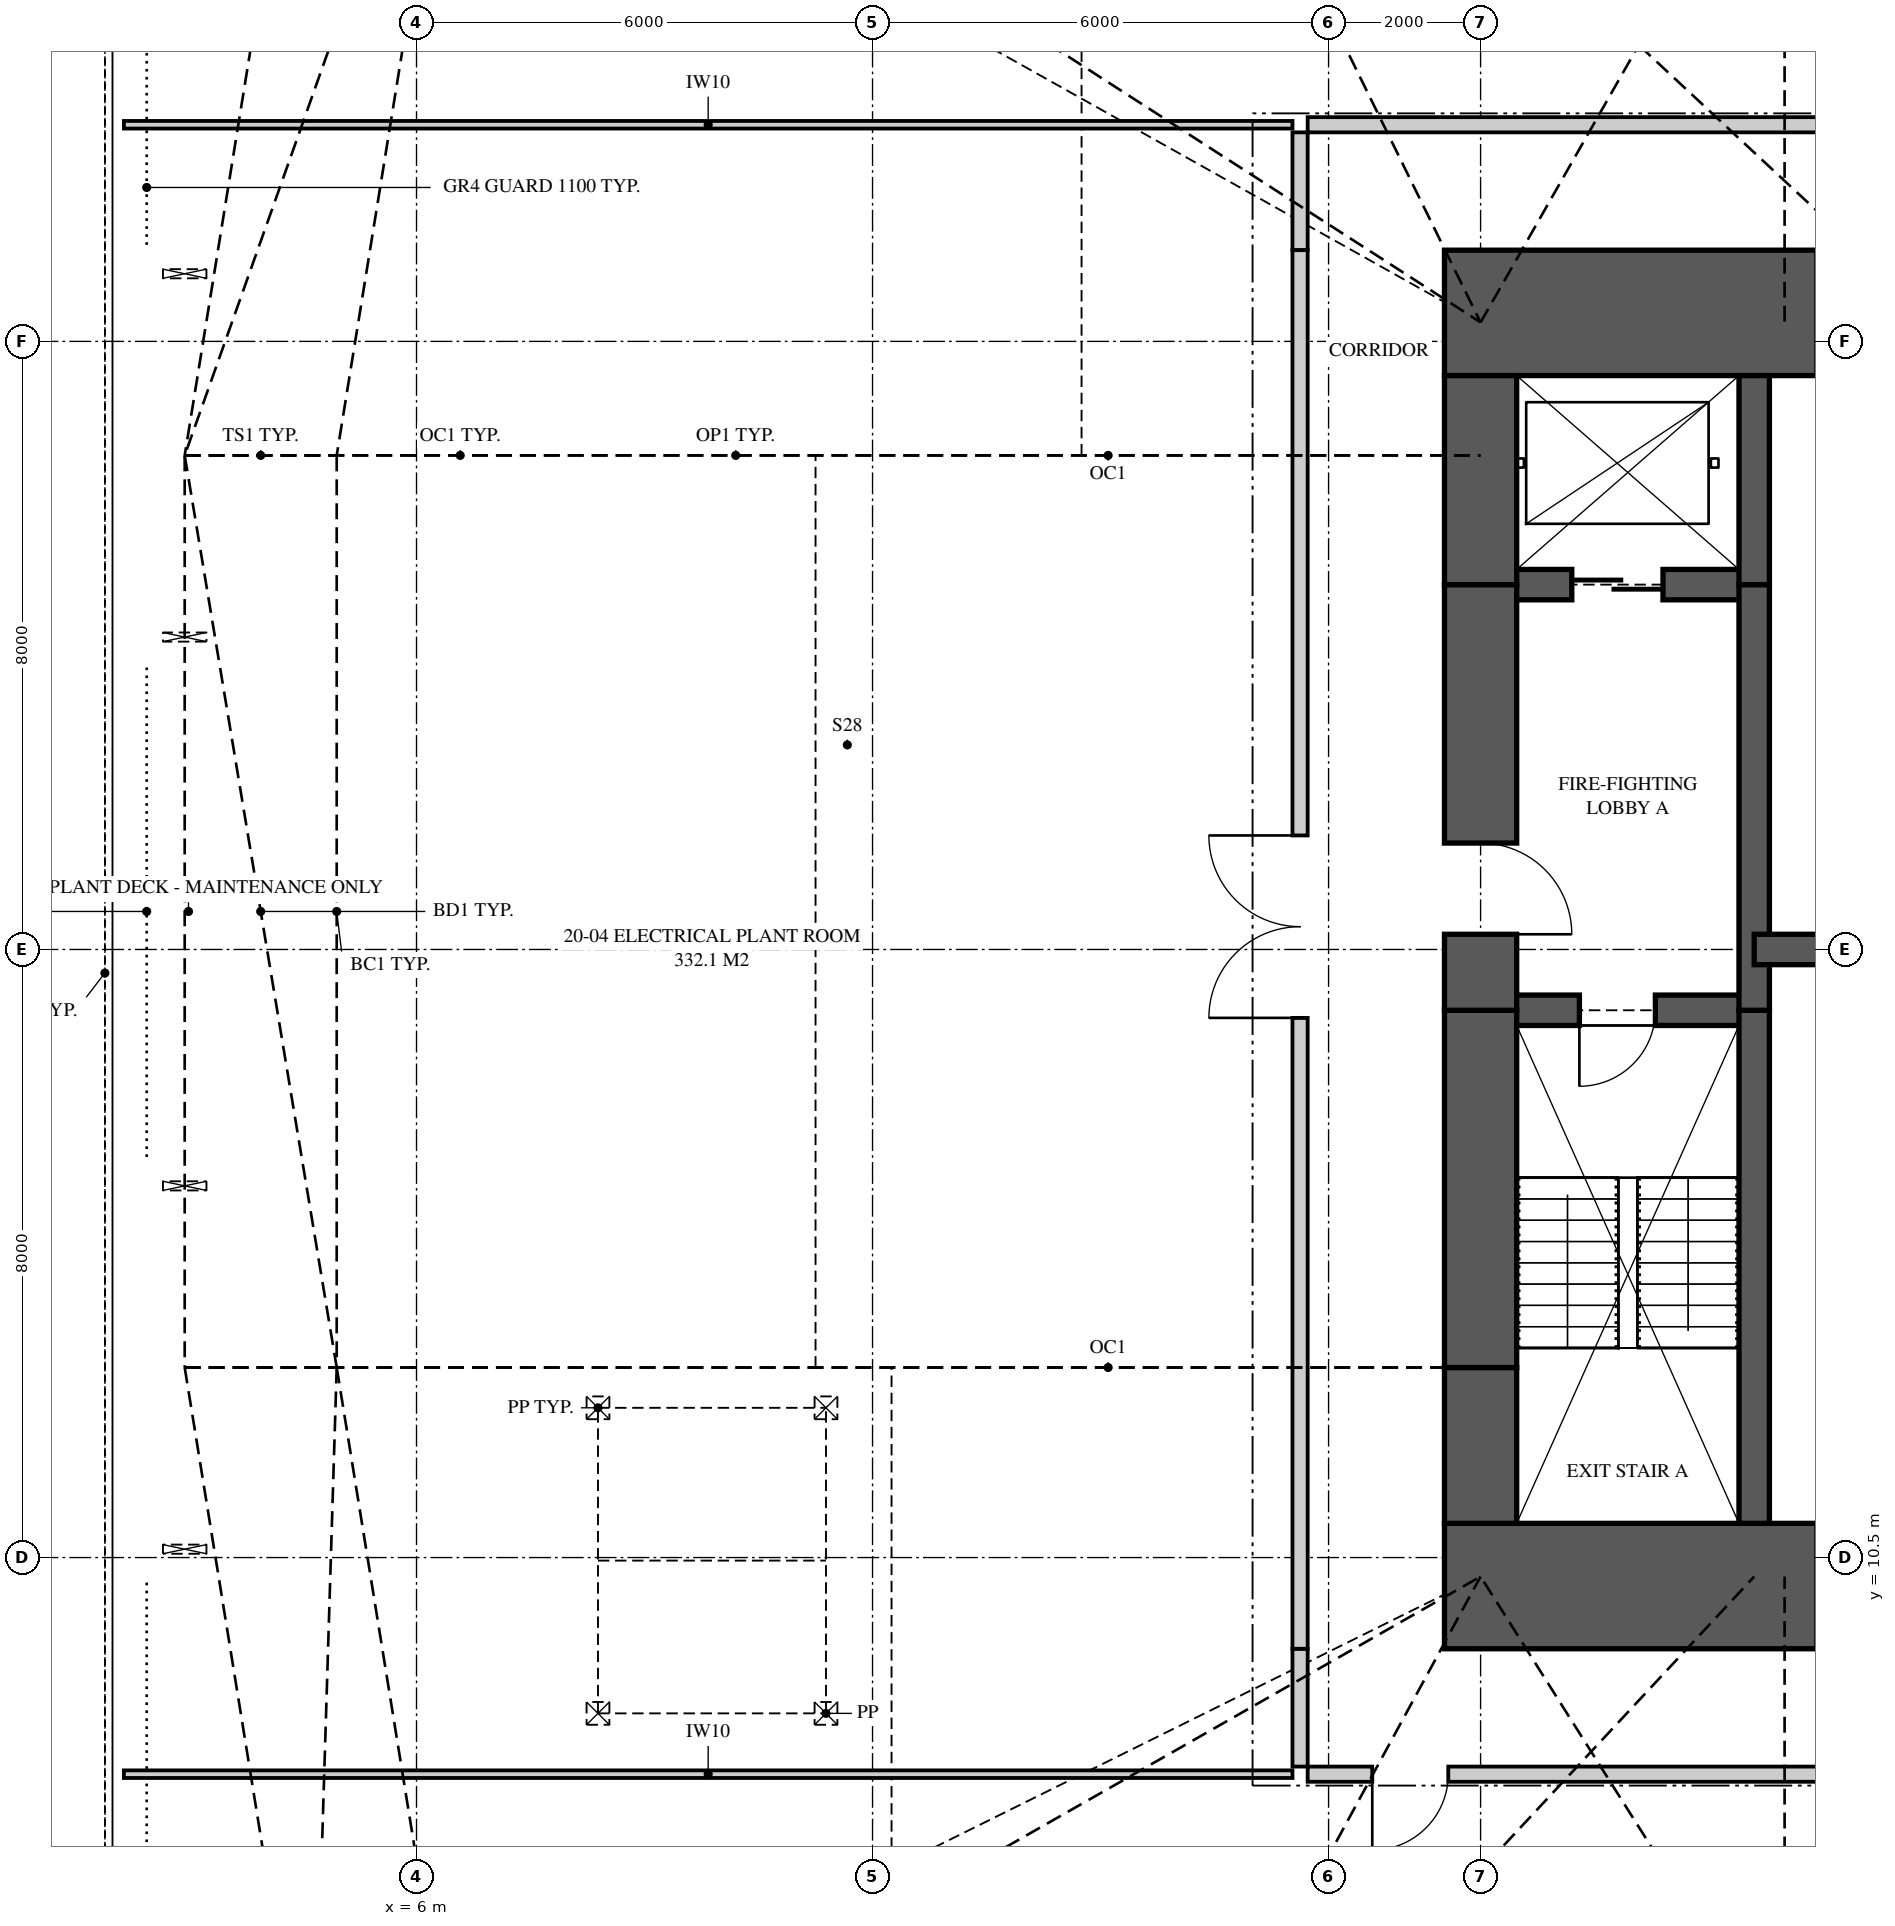
"""IFC4 building model, lengths in metres.
Left out: names, types, materials, properties, quantities, classifications, styles, units other than length and angle.
Written with IfcOpenShell. Run it as: python <this file> out.ifc"""

import sys

from ifc_helpers import new_model, si_unit, direction, frame, frame_2d, origin, place, context, subcontext, project, spatial, polyline, rectangle, outline, extrude, element, fill, save


model = new_model("IFC4")
c1 = context("Model", 3, precision=1e-05, world=origin(), true_north=direction((0.0, 1.0)))
c2 = subcontext(c1, "Body", "Model", "MODEL_VIEW")
j1 = project(units=[si_unit("LENGTHUNIT", "METRE"), si_unit("PLANEANGLEUNIT", "RADIAN")], contexts=[c1])
p1 = place(None, origin())
s1 = spatial("IfcSite", under=j1, at=p1, CompositionType="ELEMENT")
p2 = place(p1, origin())
s2 = spatial("IfcBuilding", under=s1, at=p2, CompositionType="ELEMENT")
p3 = place(p2, frame((0.0, 0.0, 74.75)))
s3 = spatial("IfcBuildingStorey", under=s2, at=p3, CompositionType="ELEMENT", Elevation=74.75)
p4 = place(p3, frame((19.525, 10.125, 0.0), z_axis=(0.0, 0.0, 1.0), x_axis=(1.0, 0.0, 0.0)))
e1 = element("IfcWall", 1, at=p4, inside=s3, PredefinedType="SHEAR", context=c2, shape_type="SweptSolid", body=[
    extrude(rectangle(XDim=6.475, YDim=1.65, at=frame_2d((3.238, 0.0))), origin(), (0.0, 0.0, 1.0), 5.0),
])
p5 = place(p4, frame((4.9, 0.0, 0.0)))
e2 = element("IfcOpeningElement", 2, at=p5, cuts=e1, PredefinedType="OPENING", context=c2, shape_type="SweptSolid", body=[
    extrude(rectangle(XDim=0.75, YDim=2.1, at=frame_2d((0.375, 1.05))), frame((0.0, 0.835, 0.0), z_axis=(0.0, -1.0, 0.0), x_axis=(1.0, 0.0, 0.0)), (0.0, 0.0, 1.0), 1.67),
])
p6 = place(p3, frame((26.0, 26.875, 0.0), z_axis=(0.0, 0.0, 1.0), x_axis=(-1.0, 0.0, 0.0)))
e3 = element("IfcWall", 3, at=p6, inside=s3, PredefinedType="SHEAR", context=c2, shape_type="SweptSolid", body=[
    extrude(rectangle(XDim=6.475, YDim=1.65, at=frame_2d((3.238, 0.0))), origin(), (0.0, 0.0, 1.0), 5.0),
])
p7 = place(p6, frame((0.825, 0.0, 0.0)))
e4 = element("IfcOpeningElement", 4, at=p7, cuts=e3, PredefinedType="OPENING", context=c2, shape_type="SweptSolid", body=[
    extrude(rectangle(XDim=0.75, YDim=2.1, at=frame_2d((0.375, 1.05))), frame((0.0, 0.835, 0.0), z_axis=(0.0, -1.0, 0.0), x_axis=(1.0, 0.0, 0.0)), (0.0, 0.0, 1.0), 1.67),
])
p8 = place(p3, frame((20.0, 26.05, 0.0), z_axis=(0.0, 0.0, 1.0), x_axis=(0.0, -1.0, 0.0)))
e5 = element("IfcWall", 5, at=p8, inside=s3, PredefinedType="SHEAR", context=c2, shape_type="SweptSolid", body=[
    extrude(rectangle(XDim=2.75, YDim=0.95, at=frame_2d((1.375, 0.0))), origin(), (0.0, 0.0, 1.0), 5.0),
])
p9 = place(p3, frame((20.0, 23.3, 0.0), z_axis=(0.0, 0.0, 1.0), x_axis=(0.0, -1.0, 0.0)))
e6 = element("IfcWall", 6, at=p9, inside=s3, PredefinedType="SHEAR", context=c2, shape_type="SweptSolid", body=[
    extrude(rectangle(XDim=5.6, YDim=0.95, at=frame_2d((2.8, 0.0))), origin(), (0.0, 0.0, 1.0), 5.0),
])
p10 = place(p9, frame((3.4, 0.0, 0.0)))
e7 = element("IfcOpeningElement", 7, at=p10, cuts=e6, PredefinedType="OPENING", context=c2, shape_type="SweptSolid", body=[
    extrude(rectangle(XDim=1.2, YDim=2.2, at=frame_2d((0.6, 1.1))), frame((0.0, 0.485, 0.0), z_axis=(0.0, -1.0, 0.0), x_axis=(1.0, 0.0, 0.0)), (0.0, 0.0, 1.0), 0.97),
])
p11 = place(p3, frame((20.0, 17.7, 0.0), z_axis=(0.0, 0.0, 1.0), x_axis=(0.0, -1.0, 0.0)))
e8 = element("IfcWall", 8, at=p11, inside=s3, PredefinedType="SHEAR", context=c2, shape_type="SweptSolid", body=[
    extrude(rectangle(XDim=4.7, YDim=0.95, at=frame_2d((2.35, 0.0))), origin(), (0.0, 0.0, 1.0), 5.0),
])
p12 = place(p3, frame((20.0, 13.0, 0.0), z_axis=(0.0, 0.0, 1.0), x_axis=(0.0, -1.0, 0.0)))
e9 = element("IfcWall", 9, at=p12, inside=s3, PredefinedType="SHEAR", context=c2, shape_type="SweptSolid", body=[
    extrude(rectangle(XDim=2.05, YDim=0.95, at=frame_2d((1.025, 0.0))), origin(), (0.0, 0.0, 1.0), 5.0),
])
p13 = place(p3, frame((23.6, 10.95, 0.0), z_axis=(0.0, 0.0, 1.0), x_axis=(0.0, 1.0, 0.0)))
e10 = element("IfcWall", 10, at=p13, inside=s3, PredefinedType="SHEAR", context=c2, shape_type="SweptSolid", body=[
    extrude(rectangle(XDim=6.75, YDim=0.4, at=frame_2d((3.375, 0.0))), origin(), (0.0, 0.0, 1.0), 5.0),
])
p14 = place(p3, frame((23.6, 17.7, 0.0), z_axis=(0.0, 0.0, 1.0), x_axis=(0.0, 1.0, 0.0)))
e11 = element("IfcWall", 11, at=p14, inside=s3, PredefinedType="SHEAR", context=c2, shape_type="SweptSolid", body=[
    extrude(rectangle(XDim=5.6, YDim=0.4, at=frame_2d((2.8, 0.0))), origin(), (0.0, 0.0, 1.0), 5.0),
])
p15 = place(p3, frame((23.6, 23.3, 0.0), z_axis=(0.0, 0.0, 1.0), x_axis=(0.0, 1.0, 0.0)))
e12 = element("IfcWall", 12, at=p15, inside=s3, PredefinedType="SHEAR", context=c2, shape_type="SweptSolid", body=[
    extrude(rectangle(XDim=2.75, YDim=0.4, at=frame_2d((1.375, 0.0))), origin(), (0.0, 0.0, 1.0), 5.0),
])
p16 = place(p3, frame((20.0, 17.7, 0.0), z_axis=(0.0, 0.0, 1.0), x_axis=(1.0, 0.0, 0.0)))
e13 = element("IfcWall", 13, at=p16, inside=s3, PredefinedType="SHEAR", context=c2, shape_type="SweptSolid", body=[
    extrude(rectangle(XDim=3.6, YDim=0.4, at=frame_2d((1.8, 0.0))), origin(), (0.0, 0.0, 1.0), 5.0),
])
p17 = place(p16, frame((1.3, 0.0, 0.0)))
e14 = element("IfcOpeningElement", 14, at=p17, cuts=e13, PredefinedType="OPENING", context=c2, shape_type="SweptSolid", body=[
    extrude(rectangle(XDim=1.0, YDim=2.1, at=frame_2d((0.5, 1.05))), frame((0.0, 0.21, 0.0), z_axis=(0.0, -1.0, 0.0), x_axis=(1.0, 0.0, 0.0)), (0.0, 0.0, 1.0), 0.42),
])
p18 = place(p3, frame((20.0, 23.3, 0.0), z_axis=(0.0, 0.0, 1.0), x_axis=(1.0, 0.0, 0.0)))
e15 = element("IfcWall", 15, at=p18, inside=s3, PredefinedType="SHEAR", context=c2, shape_type="SweptSolid", body=[
    extrude(rectangle(XDim=3.6, YDim=0.4, at=frame_2d((1.8, 0.0))), origin(), (0.0, 0.0, 1.0), 5.0),
])
p19 = place(p18, frame((1.2, 0.0, 0.0)))
e16 = element("IfcOpeningElement", 16, at=p19, cuts=e15, PredefinedType="OPENING", context=c2, shape_type="SweptSolid", body=[
    extrude(rectangle(XDim=1.2, YDim=2.1, at=frame_2d((0.6, 1.05))), frame((0.0, 0.21, 0.0), z_axis=(0.0, -1.0, 0.0), x_axis=(1.0, 0.0, 0.0)), (0.0, 0.0, 1.0), 0.42),
])
p20 = place(p3, frame((23.6, 18.5, 0.0), z_axis=(0.0, 0.0, 1.0), x_axis=(1.0, 0.0, 0.0)))
e17 = element("IfcWall", 17, at=p20, inside=s3, PredefinedType="SHEAR", context=c2, shape_type="SweptSolid", body=[
    extrude(rectangle(XDim=2.4, YDim=0.4, at=frame_2d((1.2, 0.0))), origin(), (0.0, 0.0, 1.0), 5.0),
])
p21 = place(p3, frame((17.725, 7.65, 0.0), z_axis=(0.0, 0.0, 1.0), x_axis=(1.0, 0.0, 0.0)))
e18 = element("IfcWall", 18, at=p21, inside=s3, PredefinedType="PARTITIONING", context=c2, shape_type="SweptSolid", body=[
    extrude(outline(polyline([(26.434, 0.0), (28.125, 0.0), (28.125, 0.665), (26.524, 0.665), (26.524, 2.205), (26.594, 2.302), (28.085, 2.504), (28.125, 2.504), (28.125, 3.32), (27.482, 3.32), (27.482, 4.72), (24.492, 4.72), (24.492, 4.141), (23.751, 4.141), (23.751, 4.72), (21.813, 4.72), (21.813, 4.141), (20.829, 4.141), (20.829, 4.72), (15.827, 4.72), (15.827, 4.141), (14.917, 4.141), (14.917, 4.72), (13.574, 4.72), (13.574, 4.141), (12.768, 4.141), (12.768, 4.72), (8.439, 4.72), (8.439, 4.194), (7.861, 4.194), (7.861, 4.72), (4.26, 4.72), (4.26, 4.141), (3.037, 4.141), (3.037, 4.72), (1.183, 4.72), (1.183, 4.141), (0.536, 4.141), (0.536, 4.72), (0.0, 4.72), (0.0, 0.0), (25.421, 0.0), (25.421, 1.5), (26.434, 1.5), (26.434, 0.0)]), holes=[polyline([(7.305, 3.208), (7.349, 3.323), (7.946, 3.385), (7.946, 2.858), (7.903, 2.743), (7.305, 2.68), (7.305, 3.208)])]), frame((0.0, 0.1, 0.0), z_axis=(0.0, -1.0, 0.0), x_axis=(1.0, 0.0, 0.0)), (0.0, 0.0, 1.0), 0.2),
])
p22 = place(p21, frame((0.85, 0.0, 0.0)))
e19 = element("IfcOpeningElement", 19, at=p22, cuts=e18, PredefinedType="OPENING", context=c2, shape_type="SweptSolid", body=[
    extrude(rectangle(XDim=1.0, YDim=2.1, at=frame_2d((0.5, 1.05))), frame((0.0, 0.11, 0.0), z_axis=(0.0, -1.0, 0.0), x_axis=(1.0, 0.0, 0.0)), (0.0, 0.0, 1.0), 0.22),
])
p23 = place(p21, frame((24.2, 0.0, 0.0)))
e20 = element("IfcOpeningElement", 20, at=p23, cuts=e18, PredefinedType="OPENING", context=c2, shape_type="SweptSolid", body=[
    extrude(rectangle(XDim=1.0, YDim=2.1, at=frame_2d((0.5, 1.05))), frame((0.0, 0.11, 0.0), z_axis=(0.0, -1.0, 0.0), x_axis=(1.0, 0.0, 0.0)), (0.0, 0.0, 1.0), 0.22),
])
p24 = place(p3, frame((17.625, 7.75, 0.0), z_axis=(0.0, 0.0, 1.0), x_axis=(0.0, 1.0, 0.0)))
e21 = element("IfcWall", 21, at=p24, inside=s3, PredefinedType="PARTITIONING", context=c2, shape_type="SweptSolid", body=[
    extrude(outline(polyline([(1.55, 1.5), (1.55, 4.72), (1.475, 4.72), (1.475, 4.141), (0.818, 4.141), (0.818, 4.72), (0.0, 4.72), (0.0, 0.0), (0.715, 0.0), (0.715, 1.5), (1.55, 1.5)])), frame((0.0, 0.1, 0.0), z_axis=(0.0, -1.0, 0.0), x_axis=(1.0, 0.0, 0.0)), (0.0, 0.0, 1.0), 0.2),
])
p25 = place(p3, frame((17.725, 29.35, 0.0), z_axis=(0.0, 0.0, 1.0), x_axis=(1.0, 0.0, 0.0)))
e22 = element("IfcWall", 22, at=p25, inside=s3, PredefinedType="PARTITIONING", context=c2, shape_type="SweptSolid", body=[
    extrude(outline(polyline([(26.45, 0.0), (28.125, 0.0), (28.125, 0.453), (26.643, 0.453), (26.643, 2.002), (26.645, 2.103), (28.064, 2.107), (28.125, 2.107), (28.125, 3.32), (27.644, 3.32), (27.644, 4.72), (24.664, 4.72), (24.664, 4.141), (23.958, 4.141), (23.958, 4.72), (21.409, 4.72), (21.409, 4.141), (20.503, 4.141), (20.503, 4.72), (16.071, 4.72), (16.071, 4.141), (15.218, 4.141), (15.218, 4.72), (11.452, 4.72), (11.452, 4.141), (10.557, 4.141), (10.557, 4.72), (8.439, 4.72), (8.439, 4.194), (7.861, 4.194), (7.861, 4.72), (5.937, 4.72), (5.937, 4.141), (5.029, 4.141), (5.029, 4.72), (4.087, 4.72), (4.087, 4.141), (3.429, 4.141), (3.429, 4.72), (1.309, 4.72), (1.309, 4.141), (0.685, 4.141), (0.685, 4.72), (0.0, 4.72), (0.0, 0.0), (25.439, 0.0), (25.439, 1.5), (26.45, 1.5), (26.45, 0.0)]), holes=[polyline([(7.359, 3.349), (7.399, 3.453), (7.994, 3.504), (7.994, 2.988), (7.955, 2.883), (7.359, 2.832), (7.359, 3.349)])]), frame((0.0, 0.1, 0.0), z_axis=(0.0, -1.0, 0.0), x_axis=(1.0, 0.0, 0.0)), (0.0, 0.0, 1.0), 0.2),
])
p26 = place(p25, frame((13.113, 0.0, 0.0)))
e23 = element("IfcOpeningElement", 23, at=p26, cuts=e22, PredefinedType="OPENING", context=c2, shape_type="SweptSolid", body=[
    extrude(rectangle(XDim=2.4, YDim=2.4, at=frame_2d((1.2, 1.2))), frame((0.0, 0.11, 0.0), z_axis=(0.0, -1.0, 0.0), x_axis=(1.0, 0.0, 0.0)), (0.0, 0.0, 1.0), 0.22),
])
p27 = place(p3, frame((17.625, 27.7, 0.0), z_axis=(0.0, 0.0, 1.0), x_axis=(0.0, 1.0, 0.0)))
e24 = element("IfcWall", 24, at=p27, inside=s3, PredefinedType="PARTITIONING", context=c2, shape_type="SweptSolid", body=[
    extrude(outline(polyline([(1.55, 0.0), (1.55, 4.72), (0.927, 4.72), (0.927, 4.141), (0.236, 4.141), (0.236, 4.72), (0.0, 4.72), (0.0, 1.5), (1.011, 1.5), (1.011, 0.0), (1.55, 0.0)])), frame((0.0, 0.1, 0.0), z_axis=(0.0, -1.0, 0.0), x_axis=(1.0, 0.0, 0.0)), (0.0, 0.0, 1.0), 0.2),
])
p28 = place(p3, frame((17.625, 9.3, 0.0), z_axis=(0.0, 0.0, 1.0), x_axis=(0.0, 1.0, 0.0)))
e25 = element("IfcWall", 25, at=p28, inside=s3, PredefinedType="PARTITIONING", context=c2, shape_type="SweptSolid", body=[
    extrude(outline(polyline([(18.4, 1.5), (18.4, 4.72), (16.2, 4.72), (16.2, 3.72), (15.2, 3.72), (15.2, 4.72), (4.2, 4.72), (4.2, 3.72), (3.2, 3.72), (3.2, 4.72), (0.0, 4.72), (0.0, 1.5), (0.38, 1.5), (0.38, 0.0), (18.153, 0.0), (18.153, 1.5), (18.4, 1.5)]), holes=[polyline([(3.454, 3.394), (3.946, 3.394), (3.946, 2.622), (3.454, 2.622), (3.454, 3.394)]), polyline([(15.454, 2.622), (15.454, 3.394), (15.946, 3.394), (15.946, 2.622), (15.454, 2.622)])]), frame((0.0, 0.1, 0.0), z_axis=(0.0, -1.0, 0.0), x_axis=(1.0, 0.0, 0.0)), (0.0, 0.0, 1.0), 0.2),
])
p29 = place(p28, frame((8.3, 0.0, 0.0)))
e26 = element("IfcOpeningElement", 26, at=p29, cuts=e25, PredefinedType="OPENING", context=c2, shape_type="SweptSolid", body=[
    extrude(rectangle(XDim=2.4, YDim=2.4, at=frame_2d((1.2, 1.2))), frame((0.0, 0.11, 0.0), z_axis=(0.0, -1.0, 0.0), x_axis=(1.0, 0.0, 0.0)), (0.0, 0.0, 1.0), 0.22),
])
p30 = place(p3, frame((2.15, 7.65, 0.0), z_axis=(0.0, 0.0, 1.0), x_axis=(1.0, 0.0, 0.0)))
e27 = element("IfcWall", 27, at=p30, inside=s3, PredefinedType="PARTITIONING", context=c2, shape_type="SweptSolid", body=[
    extrude(outline(polyline([(2.95, 4.72), (0.0, 4.72), (0.0, 0.0), (11.378, 0.0), (11.378, 1.5), (13.832, 1.5), (13.832, 0.0), (15.375, 0.0), (15.375, 4.72), (13.853, 4.72), (13.853, 4.141), (12.723, 4.141), (12.723, 4.72), (11.36, 4.72), (11.36, 4.12), (8.84, 4.12), (8.84, 4.72), (4.385, 4.72), (4.385, 3.32), (2.95, 3.32), (2.95, 4.72)]), holes=[polyline([(1.924, 0.773), (1.924, 2.321), (1.927, 2.376), (3.347, 2.396), (3.347, 0.848), (3.344, 0.793), (1.924, 0.773)])]), frame((0.0, 0.05, 0.0), z_axis=(0.0, -1.0, 0.0), x_axis=(1.0, 0.0, 0.0)), (0.0, 0.0, 1.0), 0.1),
])
p31 = place(p3, frame((2.15, 29.35, 0.0), z_axis=(0.0, 0.0, 1.0), x_axis=(1.0, 0.0, 0.0)))
e28 = element("IfcWall", 28, at=p31, inside=s3, PredefinedType="PARTITIONING", context=c2, shape_type="SweptSolid", body=[
    extrude(outline(polyline([(2.788, 4.72), (0.0, 4.72), (0.0, 0.0), (12.102, 0.0), (12.102, 1.5), (14.325, 1.5), (14.325, 0.0), (15.375, 0.0), (15.375, 4.72), (14.331, 4.72), (14.331, 4.141), (13.86, 4.141), (13.86, 3.92), (11.34, 3.92), (11.34, 4.72), (4.223, 4.72), (4.223, 3.32), (2.788, 3.32), (2.788, 4.72)]), holes=[polyline([(1.574, 0.378), (1.574, 1.916), (1.614, 1.967), (3.115, 2.183), (3.115, 0.645), (3.075, 0.593), (1.574, 0.378)])]), frame((0.0, 0.05, 0.0), z_axis=(0.0, -1.0, 0.0), x_axis=(1.0, 0.0, 0.0)), (0.0, 0.0, 1.0), 0.1),
])
p32 = place(p22, frame((1.0, 0.0, 0.0), z_axis=(0.0, 0.0, 1.0), x_axis=(-1.0, 0.0, 0.0)))
e29 = element("IfcDoor", 29, at=p32, inside=s3, OperationType="SINGLE_SWING_RIGHT", PredefinedType="DOOR", context=c2, shape_type="SweptSolid", body=[
    extrude(rectangle(XDim=1.0, YDim=2.1, at=frame_2d((0.5, 1.05))), frame((0.0, 0.025, 0.0), z_axis=(0.0, -1.0, 0.0), x_axis=(1.0, 0.0, 0.0)), (0.0, 0.0, 1.0), 0.05),
])
fill(e19, e29)
p33 = place(p29, origin())
e30 = element("IfcDoor", 30, at=p33, inside=s3, OperationType="DOUBLE_DOOR_SINGLE_SWING", PredefinedType="DOOR", context=c2, shape_type="SweptSolid", body=[
    extrude(rectangle(XDim=2.4, YDim=2.4, at=frame_2d((1.2, 1.2))), frame((0.0, 0.025, 0.0), z_axis=(0.0, -1.0, 0.0), x_axis=(1.0, 0.0, 0.0)), (0.0, 0.0, 1.0), 0.05),
])
fill(e26, e30)
p34 = place(p17, frame((1.0, 0.0, 0.0), z_axis=(0.0, 0.0, 1.0), x_axis=(-1.0, 0.0, 0.0)))
e31 = element("IfcDoor", 31, at=p34, inside=s3, OperationType="SINGLE_SWING_RIGHT", PredefinedType="DOOR", context=c2, shape_type="SweptSolid", body=[
    extrude(rectangle(XDim=1.0, YDim=2.1, at=frame_2d((0.5, 1.05))), frame((0.0, 0.025, 0.0), z_axis=(0.0, -1.0, 0.0), x_axis=(1.0, 0.0, 0.0)), (0.0, 0.0, 1.0), 0.05),
])
fill(e14, e31)
p35 = place(p10, origin())
e32 = element("IfcDoor", 32, at=p35, inside=s3, OperationType="SINGLE_SWING_RIGHT", PredefinedType="DOOR", context=c2, shape_type="SweptSolid", body=[
    extrude(rectangle(XDim=1.2, YDim=2.2, at=frame_2d((0.6, 1.1))), frame((0.0, 0.025, 0.0), z_axis=(0.0, -1.0, 0.0), x_axis=(1.0, 0.0, 0.0)), (0.0, 0.0, 1.0), 0.05),
])
fill(e7, e32)
p36 = place(p19, origin())
e33 = element("IfcDoor", 33, at=p36, inside=s3, OperationType="SLIDING_TO_LEFT", PredefinedType="DOOR", context=c2, shape_type="SweptSolid", body=[
    extrude(rectangle(XDim=1.2, YDim=2.1, at=frame_2d((0.6, 1.05))), frame((0.0, 0.025, 0.0), z_axis=(0.0, -1.0, 0.0), x_axis=(1.0, 0.0, 0.0)), (0.0, 0.0, 1.0), 0.05),
])
fill(e16, e33)
save(model, sys.argv[1])
